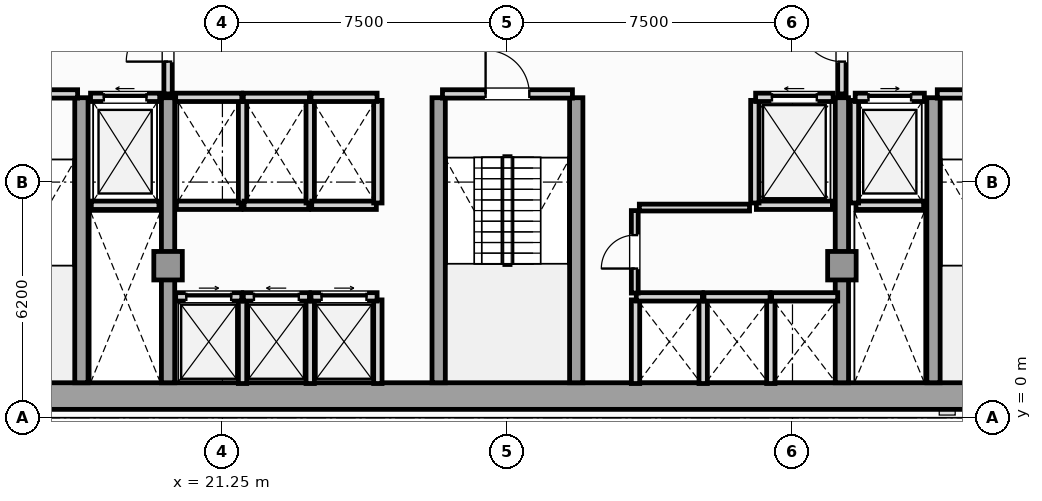
"""IFC4 building model, lengths in metres.
Left out: names, types, materials, properties, quantities, classifications, styles, units other than length and angle.
Written with IfcOpenShell. Run it as: python <this file> out.ifc"""

import sys

from ifc_helpers import new_model, si_unit, direction, frame, frame_2d, origin, origin_2d, place, context, subcontext, project, spatial, rectangle, extrude, element, fill, save


model = new_model("IFC4")
c1 = context("Model", 3, precision=1e-05, world=origin(), true_north=direction((0.0, 1.0)))
c2 = subcontext(c1, "Body", "Model", "MODEL_VIEW")
j1 = project(units=[si_unit("LENGTHUNIT", "METRE"), si_unit("PLANEANGLEUNIT", "RADIAN")], contexts=[c1])
p1 = place(None, origin())
s1 = spatial("IfcSite", under=j1, at=p1, CompositionType="ELEMENT")
p2 = place(p1, origin())
s2 = spatial("IfcBuilding", under=s1, at=p2, CompositionType="ELEMENT")
p3 = place(p2, frame((0.0, 0.0, 81.05)))
s3 = spatial("IfcBuildingStorey", under=s2, at=p3, CompositionType="ELEMENT", Elevation=81.05)
p4 = place(p3, frame((13.25, 0.57, 0.0), z_axis=(0.0, 0.0, 1.0), x_axis=(1.0, 0.0, 0.0)))
e1 = element("IfcWall", 1, at=p4, inside=s3, PredefinedType="SHEAR", context=c2, shape_type="SweptSolid", body=[
    extrude(rectangle(XDim=31.0, YDim=0.7, at=frame_2d((15.5, 0.0))), origin(), (0.0, 0.0, 1.0), 3.6),
])
for number, where, z_axis, x_axis in (
    (2, (17.54, 0.92, 0.0), (0.0, 0.0, 1.0), (0.0, 1.0, 0.0)),
    (3, (19.82, 0.92, 0.0), (0.0, 0.0, 1.0), (0.0, 1.0, 0.0)),
    (4, (26.94, 0.92, 0.0), (0.0, 0.0, 1.0), (0.0, 1.0, 0.0)),
    (5, (30.56, 0.92, 0.0), (0.0, 0.0, 1.0), (0.0, 1.0, 0.0)),
    (6, (37.55, 0.92, 0.0), (0.0, 0.0, 1.0), (0.0, 1.0, 0.0)),
    (7, (39.96, 0.92, 0.0), (0.0, 0.0, 1.0), (0.0, 1.0, 0.0)),
):
    element("IfcWall", number, at=place(p3, frame(where, z_axis=z_axis, x_axis=x_axis)), inside=s3, PredefinedType="SHEAR", context=c2, shape_type="SweptSolid", body=[
        extrude(rectangle(XDim=7.5, YDim=0.35, at=frame_2d((3.75, 0.0))), origin(), (0.0, 0.0, 1.0), 3.6),
    ])
for number, where, z_axis, x_axis in (
    (8, (19.82, 4.0, 0.0), (0.0, 0.0, 1.0), (1.0, 0.0, 0.0)),
    (9, (37.55, 4.0, 0.0), (0.0, 0.0, 1.0), (1.0, 0.0, 0.0)),
):
    element("IfcColumn", number, at=place(p3, frame(where, z_axis=z_axis, x_axis=x_axis)), inside=s3, PredefinedType="COLUMN", context=c2, shape_type="SweptSolid", body=[
        extrude(rectangle(XDim=0.75, YDim=0.75, at=origin_2d()), origin(), (0.0, 0.0, 1.0), 3.85),
    ])
p5 = place(p3, frame((17.8, 5.59, 0.0), z_axis=(0.0, 0.0, 1.0), x_axis=(1.0, 0.0, 0.0)))
e10 = element("IfcWall", 10, at=p5, inside=s3, PredefinedType="SOLIDWALL", context=c2, shape_type="SweptSolid", body=[
    extrude(rectangle(XDim=1.78, YDim=0.22, at=frame_2d((0.89, 0.0))), origin(), (0.0, 0.0, 1.0), 3.6),
])
p6 = place(p3, frame((17.78, 8.43, 0.0), z_axis=(0.0, 0.0, 1.0), x_axis=(1.0, 0.0, 0.0)))
e11 = element("IfcWall", 11, at=p6, inside=s3, PredefinedType="SOLIDWALL", context=c2, shape_type="SweptSolid", body=[
    extrude(rectangle(XDim=1.82, YDim=0.22, at=frame_2d((0.91, 0.0))), origin(), (0.0, 0.0, 1.0), 3.6),
])
p7 = place(p6, frame((0.35, 0.0, 0.0)))
e12 = element("IfcOpeningElement", 12, at=p7, cuts=e11, PredefinedType="OPENING", context=c2, shape_type="SweptSolid", body=[
    extrude(rectangle(XDim=1.12, YDim=2.25, at=frame_2d((0.56, 1.125))), frame((0.0, 0.12, 0.0), z_axis=(0.0, -1.0, 0.0), x_axis=(1.0, 0.0, 0.0)), (0.0, 0.0, 1.0), 0.24),
])
p8 = place(p3, frame((37.92, 5.59, 0.0), z_axis=(0.0, 0.0, 1.0), x_axis=(1.0, 0.0, 0.0)))
e13 = element("IfcWall", 13, at=p8, inside=s3, PredefinedType="SOLIDWALL", context=c2, shape_type="SweptSolid", body=[
    extrude(rectangle(XDim=1.78, YDim=0.22, at=frame_2d((0.89, 0.0))), origin(), (0.0, 0.0, 1.0), 3.6),
])
p9 = place(p3, frame((37.88, 5.65, 0.0), z_axis=(0.0, 0.0, 1.0), x_axis=(0.0, 1.0, 0.0)))
e14 = element("IfcWall", 14, at=p9, inside=s3, PredefinedType="SOLIDWALL", context=c2, shape_type="SweptSolid", body=[
    extrude(rectangle(XDim=2.7, YDim=0.22, at=frame_2d((1.35, 0.0))), origin(), (0.0, 0.0, 1.0), 3.6),
])
p10 = place(p3, frame((37.9, 8.43, 0.0), z_axis=(0.0, 0.0, 1.0), x_axis=(1.0, 0.0, 0.0)))
e15 = element("IfcWall", 15, at=p10, inside=s3, PredefinedType="SOLIDWALL", context=c2, shape_type="SweptSolid", body=[
    extrude(rectangle(XDim=1.82, YDim=0.22, at=frame_2d((0.91, 0.0))), origin(), (0.0, 0.0, 1.0), 3.6),
])
p11 = place(p10, frame((0.35, 0.0, 0.0)))
e16 = element("IfcOpeningElement", 16, at=p11, cuts=e15, PredefinedType="OPENING", context=c2, shape_type="SweptSolid", body=[
    extrude(rectangle(XDim=1.12, YDim=2.25, at=frame_2d((0.56, 1.125))), frame((0.0, 0.12, 0.0), z_axis=(0.0, -1.0, 0.0), x_axis=(1.0, 0.0, 0.0)), (0.0, 0.0, 1.0), 0.24),
])
p12 = place(p3, frame((35.3, 5.59, 0.0), z_axis=(0.0, 0.0, 1.0), x_axis=(1.0, 0.0, 0.0)))
e17 = element("IfcWall", 17, at=p12, inside=s3, PredefinedType="SOLIDWALL", context=c2, shape_type="SweptSolid", body=[
    extrude(rectangle(XDim=2.0, YDim=0.22, at=frame_2d((1.0, 0.0))), origin(), (0.0, 0.0, 1.0), 3.6),
])
p13 = place(p3, frame((35.26, 5.65, 0.0), z_axis=(0.0, 0.0, 1.0), x_axis=(0.0, 1.0, 0.0)))
e18 = element("IfcWall", 18, at=p13, inside=s3, PredefinedType="SOLIDWALL", context=c2, shape_type="SweptSolid", body=[
    extrude(rectangle(XDim=2.7, YDim=0.22, at=frame_2d((1.35, 0.0))), origin(), (0.0, 0.0, 1.0), 3.6),
])
p14 = place(p3, frame((35.28, 8.43, 0.0), z_axis=(0.0, 0.0, 1.0), x_axis=(1.0, 0.0, 0.0)))
e19 = element("IfcWall", 19, at=p14, inside=s3, PredefinedType="SOLIDWALL", context=c2, shape_type="SweptSolid", body=[
    extrude(rectangle(XDim=2.04, YDim=0.22, at=frame_2d((1.02, 0.0))), origin(), (0.0, 0.0, 1.0), 3.6),
])
p15 = place(p14, frame((0.43, 0.0, 0.0)))
e20 = element("IfcOpeningElement", 20, at=p15, cuts=e19, PredefinedType="OPENING", context=c2, shape_type="SweptSolid", body=[
    extrude(rectangle(XDim=1.18, YDim=2.2, at=frame_2d((0.59, 1.1))), frame((0.0, 0.12, 0.0), z_axis=(0.0, -1.0, 0.0), x_axis=(1.0, 0.0, 0.0)), (0.0, 0.0, 1.0), 0.24),
])
p16 = place(p3, frame((21.78, 0.9, 0.0), z_axis=(0.0, 0.0, 1.0), x_axis=(0.0, 1.0, 0.0)))
e21 = element("IfcWall", 21, at=p16, inside=s3, PredefinedType="SOLIDWALL", context=c2, shape_type="SweptSolid", body=[
    extrude(rectangle(XDim=2.2, YDim=0.22, at=frame_2d((1.1, 0.0))), origin(), (0.0, 0.0, 1.0), 3.6),
])
p17 = place(p3, frame((20.02, 3.18, 0.0), z_axis=(0.0, 0.0, 1.0), x_axis=(1.0, 0.0, 0.0)))
e22 = element("IfcWall", 22, at=p17, inside=s3, PredefinedType="SOLIDWALL", context=c2, shape_type="SweptSolid", body=[
    extrude(rectangle(XDim=1.74, YDim=0.22, at=frame_2d((0.87, 0.0))), origin(), (0.0, 0.0, 1.0), 3.6),
])
p18 = place(p17, frame((0.28, 0.0, 0.0)))
e23 = element("IfcOpeningElement", 23, at=p18, cuts=e22, PredefinedType="OPENING", context=c2, shape_type="SweptSolid", body=[
    extrude(rectangle(XDim=1.18, YDim=2.2, at=frame_2d((0.59, 1.1))), frame((0.0, 0.12, 0.0), z_axis=(0.0, -1.0, 0.0), x_axis=(1.0, 0.0, 0.0)), (0.0, 0.0, 1.0), 0.24),
])
p19 = place(p3, frame((23.56, 0.9, 0.0), z_axis=(0.0, 0.0, 1.0), x_axis=(0.0, 1.0, 0.0)))
e24 = element("IfcWall", 24, at=p19, inside=s3, PredefinedType="SOLIDWALL", context=c2, shape_type="SweptSolid", body=[
    extrude(rectangle(XDim=2.2, YDim=0.22, at=frame_2d((1.1, 0.0))), origin(), (0.0, 0.0, 1.0), 3.6),
])
p20 = place(p3, frame((21.8, 3.18, 0.0), z_axis=(0.0, 0.0, 1.0), x_axis=(1.0, 0.0, 0.0)))
e25 = element("IfcWall", 25, at=p20, inside=s3, PredefinedType="SOLIDWALL", context=c2, shape_type="SweptSolid", body=[
    extrude(rectangle(XDim=1.74, YDim=0.22, at=frame_2d((0.87, 0.0))), origin(), (0.0, 0.0, 1.0), 3.6),
])
p21 = place(p20, frame((0.28, 0.0, 0.0)))
e26 = element("IfcOpeningElement", 26, at=p21, cuts=e25, PredefinedType="OPENING", context=c2, shape_type="SweptSolid", body=[
    extrude(rectangle(XDim=1.18, YDim=2.2, at=frame_2d((0.59, 1.1))), frame((0.0, 0.12, 0.0), z_axis=(0.0, -1.0, 0.0), x_axis=(1.0, 0.0, 0.0)), (0.0, 0.0, 1.0), 0.24),
])
p22 = place(p3, frame((25.34, 0.9, 0.0), z_axis=(0.0, 0.0, 1.0), x_axis=(0.0, 1.0, 0.0)))
e27 = element("IfcWall", 27, at=p22, inside=s3, PredefinedType="SOLIDWALL", context=c2, shape_type="SweptSolid", body=[
    extrude(rectangle(XDim=2.2, YDim=0.22, at=frame_2d((1.1, 0.0))), origin(), (0.0, 0.0, 1.0), 3.6),
])
p23 = place(p3, frame((23.58, 3.18, 0.0), z_axis=(0.0, 0.0, 1.0), x_axis=(1.0, 0.0, 0.0)))
e28 = element("IfcWall", 28, at=p23, inside=s3, PredefinedType="SOLIDWALL", context=c2, shape_type="SweptSolid", body=[
    extrude(rectangle(XDim=1.74, YDim=0.22, at=frame_2d((0.87, 0.0))), origin(), (0.0, 0.0, 1.0), 3.6),
])
p24 = place(p23, frame((0.28, 0.0, 0.0)))
e29 = element("IfcOpeningElement", 29, at=p24, cuts=e28, PredefinedType="OPENING", context=c2, shape_type="SweptSolid", body=[
    extrude(rectangle(XDim=1.18, YDim=2.2, at=frame_2d((0.59, 1.1))), frame((0.0, 0.12, 0.0), z_axis=(0.0, -1.0, 0.0), x_axis=(1.0, 0.0, 0.0)), (0.0, 0.0, 1.0), 0.24),
])
for number, where, z_axis, x_axis in (
    (30, (32.12, 0.9, 0.0), (0.0, 0.0, 1.0), (0.0, 1.0, 0.0)),
    (31, (33.9, 0.9, 0.0), (0.0, 0.0, 1.0), (0.0, 1.0, 0.0)),
):
    element("IfcWall", number, at=place(p3, frame(where, z_axis=z_axis, x_axis=x_axis)), inside=s3, PredefinedType="SOLIDWALL", context=c2, shape_type="SweptSolid", body=[
        extrude(rectangle(XDim=2.2, YDim=0.22, at=frame_2d((1.1, 0.0))), origin(), (0.0, 0.0, 1.0), 3.6),
    ])
p25 = place(p3, frame((32.14, 3.18, 0.0), z_axis=(0.0, 0.0, 1.0), x_axis=(1.0, 0.0, 0.0)))
e32 = element("IfcWall", 32, at=p25, inside=s3, PredefinedType="SOLIDWALL", context=c2, shape_type="SweptSolid", body=[
    extrude(rectangle(XDim=1.74, YDim=0.22, at=frame_2d((0.87, 0.0))), origin(), (0.0, 0.0, 1.0), 3.6),
])
p26 = place(p3, frame((35.68, 0.9, 0.0), z_axis=(0.0, 0.0, 1.0), x_axis=(0.0, 1.0, 0.0)))
e33 = element("IfcWall", 33, at=p26, inside=s3, PredefinedType="SOLIDWALL", context=c2, shape_type="SweptSolid", body=[
    extrude(rectangle(XDim=2.2, YDim=0.22, at=frame_2d((1.1, 0.0))), origin(), (0.0, 0.0, 1.0), 3.6),
])
for number, where, z_axis, x_axis in (
    (34, (33.92, 3.18, 0.0), (0.0, 0.0, 1.0), (1.0, 0.0, 0.0)),
    (35, (35.7, 3.18, 0.0), (0.0, 0.0, 1.0), (1.0, 0.0, 0.0)),
):
    element("IfcWall", number, at=place(p3, frame(where, z_axis=z_axis, x_axis=x_axis)), inside=s3, PredefinedType="SOLIDWALL", context=c2, shape_type="SweptSolid", body=[
        extrude(rectangle(XDim=1.74, YDim=0.22, at=frame_2d((0.87, 0.0))), origin(), (0.0, 0.0, 1.0), 3.6),
    ])
p27 = place(p3, frame((20.04, 5.59, 0.0), z_axis=(0.0, 0.0, 1.0), x_axis=(1.0, 0.0, 0.0)))
e36 = element("IfcWall", 36, at=p27, inside=s3, PredefinedType="SOLIDWALL", context=c2, shape_type="SweptSolid", body=[
    extrude(rectangle(XDim=1.7, YDim=0.22, at=frame_2d((0.85, 0.0))), origin(), (0.0, 0.0, 1.0), 3.6),
])
p28 = place(p3, frame((21.78, 5.65, 0.0), z_axis=(0.0, 0.0, 1.0), x_axis=(0.0, 1.0, 0.0)))
e37 = element("IfcWall", 37, at=p28, inside=s3, PredefinedType="SOLIDWALL", context=c2, shape_type="SweptSolid", body=[
    extrude(rectangle(XDim=2.7, YDim=0.22, at=frame_2d((1.35, 0.0))), origin(), (0.0, 0.0, 1.0), 3.6),
])
p29 = place(p3, frame((20.02, 8.43, 0.0), z_axis=(0.0, 0.0, 1.0), x_axis=(1.0, 0.0, 0.0)))
e38 = element("IfcWall", 38, at=p29, inside=s3, PredefinedType="SOLIDWALL", context=c2, shape_type="SweptSolid", body=[
    extrude(rectangle(XDim=1.74, YDim=0.22, at=frame_2d((0.87, 0.0))), origin(), (0.0, 0.0, 1.0), 3.6),
])
p30 = place(p3, frame((21.82, 5.59, 0.0), z_axis=(0.0, 0.0, 1.0), x_axis=(1.0, 0.0, 0.0)))
e39 = element("IfcWall", 39, at=p30, inside=s3, PredefinedType="SOLIDWALL", context=c2, shape_type="SweptSolid", body=[
    extrude(rectangle(XDim=1.7, YDim=0.22, at=frame_2d((0.85, 0.0))), origin(), (0.0, 0.0, 1.0), 3.6),
])
p31 = place(p3, frame((23.56, 5.65, 0.0), z_axis=(0.0, 0.0, 1.0), x_axis=(0.0, 1.0, 0.0)))
e40 = element("IfcWall", 40, at=p31, inside=s3, PredefinedType="SOLIDWALL", context=c2, shape_type="SweptSolid", body=[
    extrude(rectangle(XDim=2.7, YDim=0.22, at=frame_2d((1.35, 0.0))), origin(), (0.0, 0.0, 1.0), 3.6),
])
p32 = place(p3, frame((21.8, 8.43, 0.0), z_axis=(0.0, 0.0, 1.0), x_axis=(1.0, 0.0, 0.0)))
e41 = element("IfcWall", 41, at=p32, inside=s3, PredefinedType="SOLIDWALL", context=c2, shape_type="SweptSolid", body=[
    extrude(rectangle(XDim=1.74, YDim=0.22, at=frame_2d((0.87, 0.0))), origin(), (0.0, 0.0, 1.0), 3.6),
])
p33 = place(p3, frame((23.6, 5.59, 0.0), z_axis=(0.0, 0.0, 1.0), x_axis=(1.0, 0.0, 0.0)))
e42 = element("IfcWall", 42, at=p33, inside=s3, PredefinedType="SOLIDWALL", context=c2, shape_type="SweptSolid", body=[
    extrude(rectangle(XDim=1.7, YDim=0.22, at=frame_2d((0.85, 0.0))), origin(), (0.0, 0.0, 1.0), 3.6),
])
p34 = place(p3, frame((25.34, 5.65, 0.0), z_axis=(0.0, 0.0, 1.0), x_axis=(0.0, 1.0, 0.0)))
e43 = element("IfcWall", 43, at=p34, inside=s3, PredefinedType="SOLIDWALL", context=c2, shape_type="SweptSolid", body=[
    extrude(rectangle(XDim=2.7, YDim=0.22, at=frame_2d((1.35, 0.0))), origin(), (0.0, 0.0, 1.0), 3.6),
])
p35 = place(p3, frame((23.58, 8.43, 0.0), z_axis=(0.0, 0.0, 1.0), x_axis=(1.0, 0.0, 0.0)))
e44 = element("IfcWall", 44, at=p35, inside=s3, PredefinedType="SOLIDWALL", context=c2, shape_type="SweptSolid", body=[
    extrude(rectangle(XDim=1.74, YDim=0.22, at=frame_2d((0.87, 0.0))), origin(), (0.0, 0.0, 1.0), 3.6),
])
p36 = place(p3, frame((14.04, 8.52, 0.0), z_axis=(0.0, 0.0, 1.0), x_axis=(1.0, 0.0, 0.0)))
e45 = element("IfcWall", 45, at=p36, inside=s3, PredefinedType="SOLIDWALL", context=c2, shape_type="SweptSolid", body=[
    extrude(rectangle(XDim=3.4, YDim=0.22, at=frame_2d((1.7, 0.0))), origin(), (0.0, 0.0, 1.0), 3.6),
])
p37 = place(p36, frame((1.125, 0.0, 0.0)))
e46 = element("IfcOpeningElement", 46, at=p37, cuts=e45, PredefinedType="OPENING", context=c2, shape_type="SweptSolid", body=[
    extrude(rectangle(XDim=1.15, YDim=2.2, at=frame_2d((0.575, 1.1))), frame((0.0, 0.12, 0.0), z_axis=(0.0, -1.0, 0.0), x_axis=(1.0, 0.0, 0.0)), (0.0, 0.0, 1.0), 0.24),
])
p38 = place(p3, frame((40.06, 8.52, 0.0), z_axis=(0.0, 0.0, 1.0), x_axis=(1.0, 0.0, 0.0)))
e47 = element("IfcWall", 47, at=p38, inside=s3, PredefinedType="SOLIDWALL", context=c2, shape_type="SweptSolid", body=[
    extrude(rectangle(XDim=3.4, YDim=0.22, at=frame_2d((1.7, 0.0))), origin(), (0.0, 0.0, 1.0), 3.6),
])
p39 = place(p38, frame((1.125, 0.0, 0.0)))
e48 = element("IfcOpeningElement", 48, at=p39, cuts=e47, PredefinedType="OPENING", context=c2, shape_type="SweptSolid", body=[
    extrude(rectangle(XDim=1.15, YDim=2.2, at=frame_2d((0.575, 1.1))), frame((0.0, 0.12, 0.0), z_axis=(0.0, -1.0, 0.0), x_axis=(1.0, 0.0, 0.0)), (0.0, 0.0, 1.0), 0.24),
])
p40 = place(p3, frame((27.04, 8.52, 0.0), z_axis=(0.0, 0.0, 1.0), x_axis=(1.0, 0.0, 0.0)))
e49 = element("IfcWall", 49, at=p40, inside=s3, PredefinedType="SOLIDWALL", context=c2, shape_type="SweptSolid", body=[
    extrude(rectangle(XDim=3.42, YDim=0.22, at=frame_2d((1.71, 0.0))), origin(), (0.0, 0.0, 1.0), 3.6),
])
p41 = place(p40, frame((1.135, 0.0, 0.0)))
e50 = element("IfcOpeningElement", 50, at=p41, cuts=e49, PredefinedType="OPENING", context=c2, shape_type="SweptSolid", body=[
    extrude(rectangle(XDim=1.15, YDim=2.2, at=frame_2d((0.575, 1.1))), frame((0.0, 0.12, 0.0), z_axis=(0.0, -1.0, 0.0), x_axis=(1.0, 0.0, 0.0)), (0.0, 0.0, 1.0), 0.24),
])
p42 = place(p3, frame((19.82, 8.52, 0.0), z_axis=(0.0, 0.0, 1.0), x_axis=(0.0, 1.0, 0.0)))
e51 = element("IfcWall", 51, at=p42, inside=s3, PredefinedType="SOLIDWALL", context=c2, shape_type="SweptSolid", body=[
    extrude(rectangle(XDim=2.8, YDim=0.22, at=frame_2d((1.4, 0.0))), origin(), (0.0, 0.0, 1.0), 3.055),
])
p43 = place(p42, frame((0.85, 0.0, 0.0)))
e52 = element("IfcOpeningElement", 52, at=p43, cuts=e51, PredefinedType="OPENING", context=c2, shape_type="SweptSolid", body=[
    extrude(rectangle(XDim=1.1, YDim=2.2, at=frame_2d((0.55, 1.1))), frame((0.0, 0.12, 0.0), z_axis=(0.0, -1.0, 0.0), x_axis=(1.0, 0.0, 0.0)), (0.0, 0.0, 1.0), 0.24),
])
p44 = place(p3, frame((37.55, 8.52, 0.0), z_axis=(0.0, 0.0, 1.0), x_axis=(0.0, 1.0, 0.0)))
e53 = element("IfcWall", 53, at=p44, inside=s3, PredefinedType="SOLIDWALL", context=c2, shape_type="SweptSolid", body=[
    extrude(rectangle(XDim=2.8, YDim=0.22, at=frame_2d((1.4, 0.0))), origin(), (0.0, 0.0, 1.0), 3.055),
])
p45 = place(p44, frame((0.85, 0.0, 0.0)))
e54 = element("IfcOpeningElement", 54, at=p45, cuts=e53, PredefinedType="OPENING", context=c2, shape_type="SweptSolid", body=[
    extrude(rectangle(XDim=1.1, YDim=2.2, at=frame_2d((0.55, 1.1))), frame((0.0, 0.12, 0.0), z_axis=(0.0, -1.0, 0.0), x_axis=(1.0, 0.0, 0.0)), (0.0, 0.0, 1.0), 0.24),
])
p46 = place(p3, frame((32.1, 3.28, 0.0), z_axis=(0.0, 0.0, 1.0), x_axis=(0.0, 1.0, 0.0)))
e55 = element("IfcWall", 55, at=p46, inside=s3, PredefinedType="PARTITIONING", context=c2, shape_type="SweptSolid", body=[
    extrude(rectangle(XDim=2.17, YDim=0.18, at=frame_2d((1.085, 0.0))), origin(), (0.0, 0.0, 1.0), 3.6),
])
p47 = place(p46, frame((0.645, 0.0, 0.0)))
e56 = element("IfcOpeningElement", 56, at=p47, cuts=e55, PredefinedType="OPENING", context=c2, shape_type="SweptSolid", body=[
    extrude(rectangle(XDim=0.88, YDim=2.05, at=frame_2d((0.44, 1.025))), frame((0.0, 0.1, 0.0), z_axis=(0.0, -1.0, 0.0), x_axis=(1.0, 0.0, 0.0)), (0.0, 0.0, 1.0), 0.2),
])
p48 = place(p3, frame((32.22, 5.53, 0.0), z_axis=(0.0, 0.0, 1.0), x_axis=(1.0, 0.0, 0.0)))
e57 = element("IfcWall", 57, at=p48, inside=s3, PredefinedType="PARTITIONING", context=c2, shape_type="SweptSolid", body=[
    extrude(rectangle(XDim=2.9, YDim=0.18, at=frame_2d((1.45, 0.0))), origin(), (0.0, 0.0, 1.0), 3.6),
])
p49 = place(p7, origin())
e58 = element("IfcDoor", 58, at=p49, inside=s3, OperationType="SLIDING_TO_LEFT", PredefinedType="DOOR", context=c2, shape_type="SweptSolid", body=[
    extrude(rectangle(XDim=1.12, YDim=2.25, at=frame_2d((0.56, 1.125))), frame((0.0, 0.025, 0.0), z_axis=(0.0, -1.0, 0.0), x_axis=(1.0, 0.0, 0.0)), (0.0, 0.0, 1.0), 0.05),
])
fill(e12, e58)
p50 = place(p11, origin())
e59 = element("IfcDoor", 59, at=p50, inside=s3, OperationType="SLIDING_TO_RIGHT", PredefinedType="DOOR", context=c2, shape_type="SweptSolid", body=[
    extrude(rectangle(XDim=1.12, YDim=2.25, at=frame_2d((0.56, 1.125))), frame((0.0, 0.025, 0.0), z_axis=(0.0, -1.0, 0.0), x_axis=(1.0, 0.0, 0.0)), (0.0, 0.0, 1.0), 0.05),
])
fill(e16, e59)
p51 = place(p15, origin())
e60 = element("IfcDoor", 60, at=p51, inside=s3, OperationType="SLIDING_TO_LEFT", PredefinedType="DOOR", context=c2, shape_type="SweptSolid", body=[
    extrude(rectangle(XDim=1.18, YDim=2.2, at=frame_2d((0.59, 1.1))), frame((0.0, 0.025, 0.0), z_axis=(0.0, -1.0, 0.0), x_axis=(1.0, 0.0, 0.0)), (0.0, 0.0, 1.0), 0.05),
])
fill(e20, e60)
p52 = place(p18, origin())
e61 = element("IfcDoor", 61, at=p52, inside=s3, OperationType="SLIDING_TO_RIGHT", PredefinedType="DOOR", context=c2, shape_type="SweptSolid", body=[
    extrude(rectangle(XDim=1.18, YDim=2.2, at=frame_2d((0.59, 1.1))), frame((0.0, 0.025, 0.0), z_axis=(0.0, -1.0, 0.0), x_axis=(1.0, 0.0, 0.0)), (0.0, 0.0, 1.0), 0.05),
])
fill(e23, e61)
p53 = place(p21, origin())
e62 = element("IfcDoor", 62, at=p53, inside=s3, OperationType="SLIDING_TO_LEFT", PredefinedType="DOOR", context=c2, shape_type="SweptSolid", body=[
    extrude(rectangle(XDim=1.18, YDim=2.2, at=frame_2d((0.59, 1.1))), frame((0.0, 0.025, 0.0), z_axis=(0.0, -1.0, 0.0), x_axis=(1.0, 0.0, 0.0)), (0.0, 0.0, 1.0), 0.05),
])
fill(e26, e62)
p54 = place(p24, origin())
e63 = element("IfcDoor", 63, at=p54, inside=s3, OperationType="SLIDING_TO_RIGHT", PredefinedType="DOOR", context=c2, shape_type="SweptSolid", body=[
    extrude(rectangle(XDim=1.18, YDim=2.2, at=frame_2d((0.59, 1.1))), frame((0.0, 0.025, 0.0), z_axis=(0.0, -1.0, 0.0), x_axis=(1.0, 0.0, 0.0)), (0.0, 0.0, 1.0), 0.05),
])
fill(e29, e63)
p55 = place(p41, origin())
e64 = element("IfcDoor", 64, at=p55, inside=s3, OperationType="SINGLE_SWING_LEFT", PredefinedType="DOOR", context=c2, shape_type="SweptSolid", body=[
    extrude(rectangle(XDim=1.15, YDim=2.2, at=frame_2d((0.575, 1.1))), frame((0.0, 0.025, 0.0), z_axis=(0.0, -1.0, 0.0), x_axis=(1.0, 0.0, 0.0)), (0.0, 0.0, 1.0), 0.05),
])
fill(e50, e64)
p56 = place(p43, origin())
e65 = element("IfcDoor", 65, at=p56, inside=s3, OperationType="SINGLE_SWING_LEFT", PredefinedType="DOOR", context=c2, shape_type="SweptSolid", body=[
    extrude(rectangle(XDim=1.1, YDim=2.2, at=frame_2d((0.55, 1.1))), frame((0.0, 0.025, 0.0), z_axis=(0.0, -1.0, 0.0), x_axis=(1.0, 0.0, 0.0)), (0.0, 0.0, 1.0), 0.05),
])
fill(e52, e65)
p57 = place(p45, origin())
e66 = element("IfcDoor", 66, at=p57, inside=s3, OperationType="SINGLE_SWING_RIGHT", PredefinedType="DOOR", context=c2, shape_type="SweptSolid", body=[
    extrude(rectangle(XDim=1.1, YDim=2.2, at=frame_2d((0.55, 1.1))), frame((0.0, 0.025, 0.0), z_axis=(0.0, -1.0, 0.0), x_axis=(1.0, 0.0, 0.0)), (0.0, 0.0, 1.0), 0.05),
])
fill(e54, e66)
p58 = place(p47, origin())
e67 = element("IfcDoor", 67, at=p58, inside=s3, OperationType="SINGLE_SWING_LEFT", PredefinedType="DOOR", context=c2, shape_type="SweptSolid", body=[
    extrude(rectangle(XDim=0.88, YDim=2.05, at=frame_2d((0.44, 1.025))), frame((0.0, 0.025, 0.0), z_axis=(0.0, -1.0, 0.0), x_axis=(1.0, 0.0, 0.0)), (0.0, 0.0, 1.0), 0.05),
])
fill(e56, e67)
save(model, sys.argv[1])
